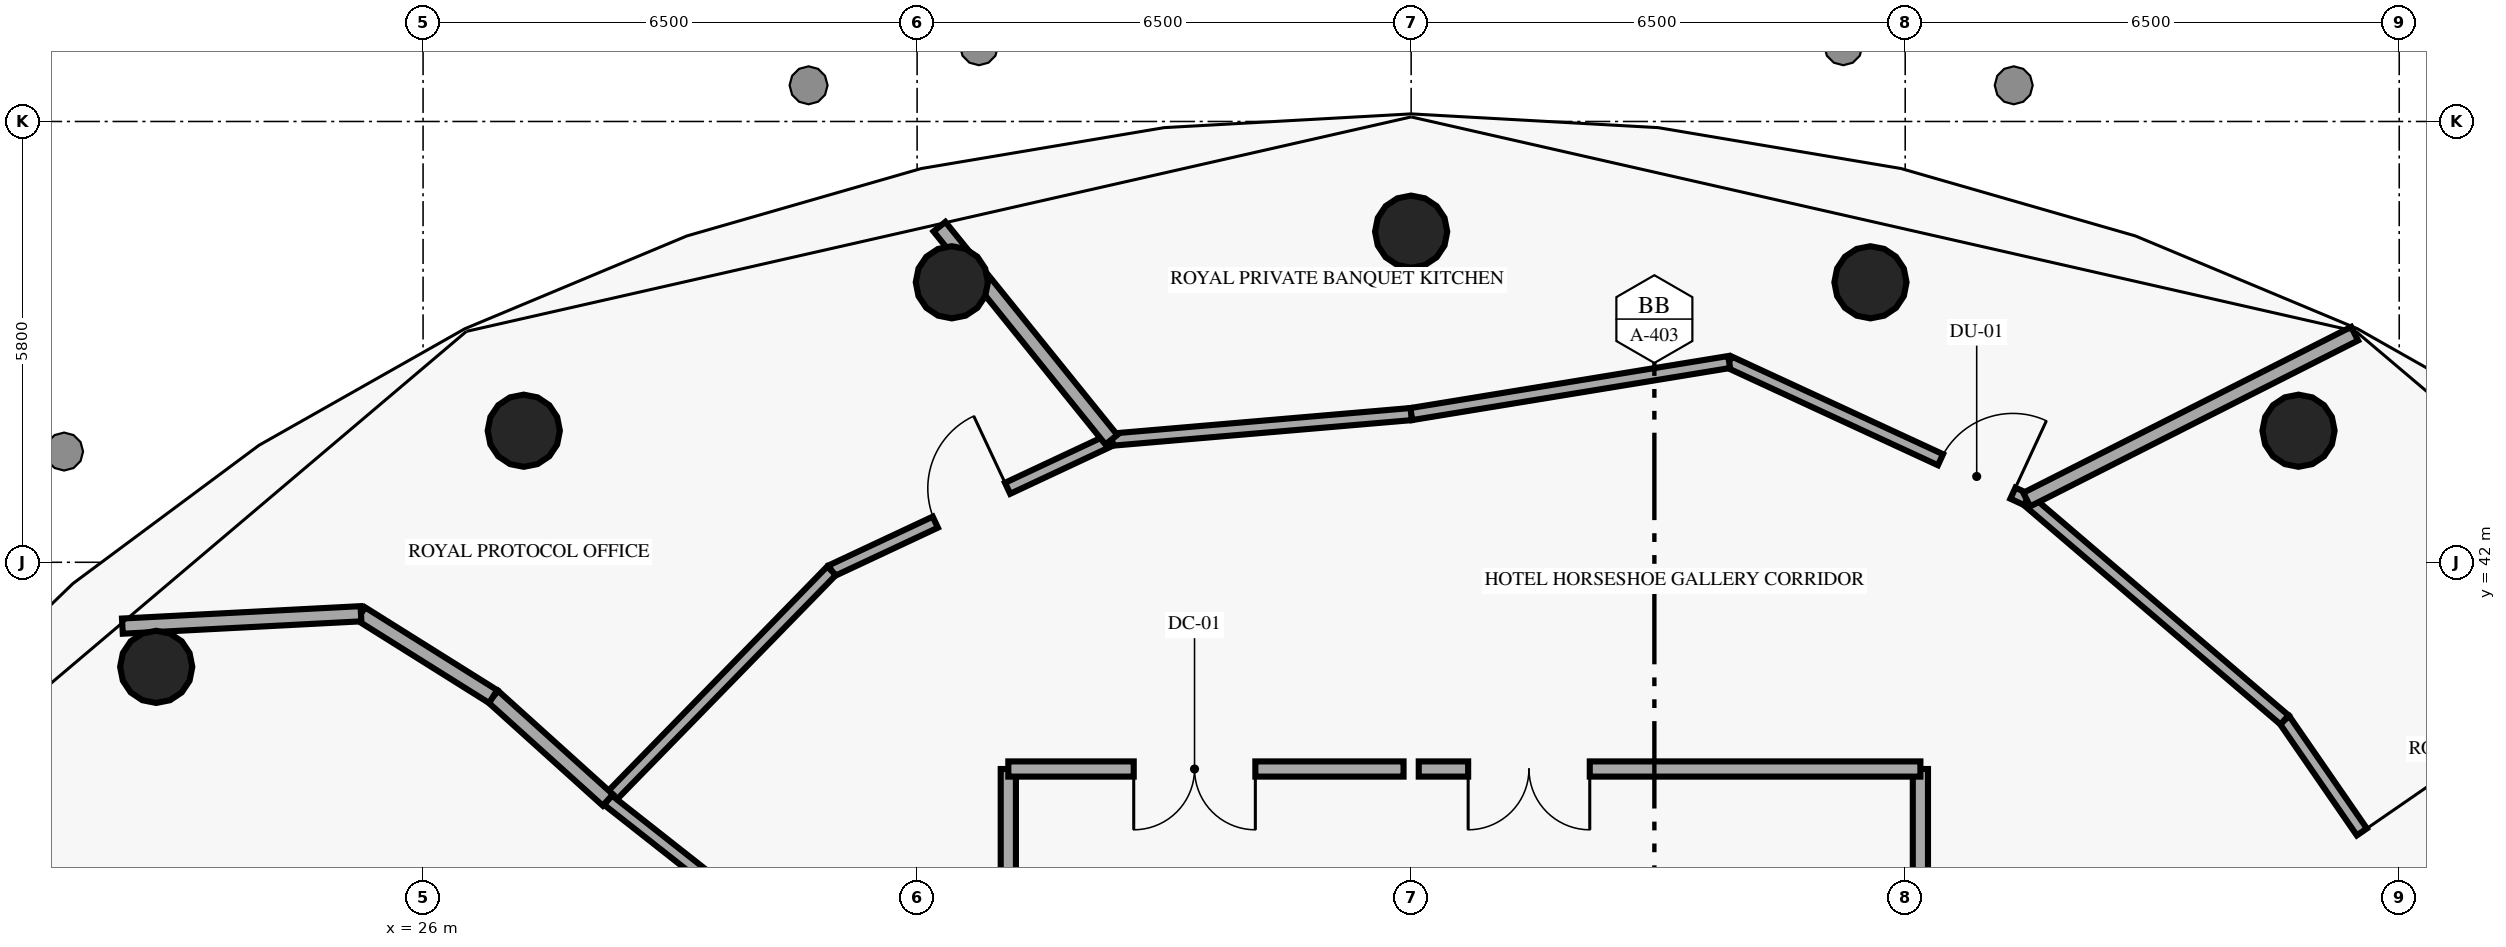
"""IFC4 building model, lengths in metres.
Left out: names, types, materials, properties, quantities, classifications, styles, units other than length and angle.
Written with IfcOpenShell. Run it as: python <this file> out.ifc"""

import sys

from ifc_helpers import new_model, si_unit, direction, frame, frame_2d, origin, origin_2d, place, context, subcontext, project, spatial, rectangle, circle, extrude, element, fill, save


model = new_model("IFC4")
c1 = context("Model", 3, precision=1e-05, world=origin(), true_north=direction((0.0, 1.0)))
c2 = subcontext(c1, "Body", "Model", "MODEL_VIEW")
j1 = project(units=[si_unit("LENGTHUNIT", "METRE"), si_unit("PLANEANGLEUNIT", "RADIAN")], contexts=[c1])
p1 = place(None, origin())
s1 = spatial("IfcSite", under=j1, at=p1, CompositionType="ELEMENT")
p2 = place(p1, origin())
s2 = spatial("IfcBuilding", under=s1, at=p2, CompositionType="ELEMENT")
p3 = place(p2, frame((0.0, 0.0, 192.25)))
s3 = spatial("IfcBuildingStorey", under=s2, at=p3, CompositionType="ELEMENT", Elevation=192.25)
for number, where, z_axis, x_axis in (
    (1, (50.675, 43.731, 0.0), (0.0, 0.0, 1.0), (1.0, 0.0, 0.0)),
    (2, (45.043, 45.684, 0.0), (0.0, 0.0, 1.0), (1.0, 0.0, 0.0)),
    (3, (39.0, 46.35, 0.0), (0.0, 0.0, 1.0), (1.0, 0.0, 0.0)),
    (4, (32.957, 45.684, 0.0), (0.0, 0.0, 1.0), (1.0, 0.0, 0.0)),
    (5, (27.325, 43.731, 0.0), (0.0, 0.0, 1.0), (1.0, 0.0, 0.0)),
    (6, (22.489, 40.624, 0.0), (0.0, 0.0, 1.0), (1.0, 0.0, 0.0)),
):
    element("IfcColumn", number, at=place(p3, frame(where, z_axis=z_axis, x_axis=x_axis)), inside=s3, PredefinedType="COLUMN", context=c2, shape_type="SweptSolid", body=[
        extrude(circle(Radius=0.475, at=origin_2d()), origin(), (0.0, 0.0, 1.0), 3.35),
    ])
for number, where, z_axis, x_axis in (
    (7, (33.7, 37.4, 0.0), (0.0, 0.0, 1.0), (0.0, 1.0, 0.0)),
    (8, (45.7, 37.4, 0.0), (0.0, 0.0, 1.0), (0.0, 1.0, 0.0)),
):
    element("IfcWall", number, at=place(p3, frame(where, z_axis=z_axis, x_axis=x_axis)), inside=s3, PredefinedType="SOLIDWALL", context=c2, shape_type="SweptSolid", body=[
        extrude(rectangle(XDim=1.88, YDim=0.2, at=frame_2d((0.94, 0.0))), origin(), (0.0, 0.0, 1.0), 3.35),
    ])
p4 = place(p3, frame((38.9, 39.28, 0.0), z_axis=(0.0, 0.0, 1.0), x_axis=(-1.0, 0.0, 0.0)))
e9 = element("IfcWall", 9, at=p4, inside=s3, PredefinedType="SOLIDWALL", context=c2, shape_type="SweptSolid", body=[
    extrude(rectangle(XDim=5.2, YDim=0.2, at=frame_2d((2.6, 0.0))), origin(), (0.0, 0.0, 1.0), 3.35),
])
p5 = place(p4, frame((1.95, 0.0, 0.0)))
e10 = element("IfcOpeningElement", 10, at=p5, cuts=e9, PredefinedType="OPENING", context=c2, shape_type="SweptSolid", body=[
    extrude(rectangle(XDim=1.6, YDim=2.2, at=frame_2d((0.8, 1.1))), frame((0.0, 0.11, 0.0), z_axis=(0.0, -1.0, 0.0), x_axis=(1.0, 0.0, 0.0)), (0.0, 0.0, 1.0), 0.22),
])
p6 = place(p3, frame((45.7, 39.28, 0.0), z_axis=(0.0, 0.0, 1.0), x_axis=(-1.0, 0.0, 0.0)))
e11 = element("IfcWall", 11, at=p6, inside=s3, PredefinedType="SOLIDWALL", context=c2, shape_type="SweptSolid", body=[
    extrude(rectangle(XDim=6.6, YDim=0.2, at=frame_2d((3.3, 0.0))), origin(), (0.0, 0.0, 1.0), 3.35),
])
p7 = place(p6, frame((4.35, 0.0, 0.0)))
e12 = element("IfcOpeningElement", 12, at=p7, cuts=e11, PredefinedType="OPENING", context=c2, shape_type="SweptSolid", body=[
    extrude(rectangle(XDim=1.6, YDim=2.2, at=frame_2d((0.8, 1.1))), frame((0.0, 0.11, 0.0), z_axis=(0.0, -1.0, 0.0), x_axis=(1.0, 0.0, 0.0)), (0.0, 0.0, 1.0), 0.22),
])
p8 = place(p3, frame((50.491, 39.926, 0.0), z_axis=(0.0, 0.0, 1.0), x_axis=(0.567945986758, -0.823065827334, 0.0)))
e13 = element("IfcWall", 13, at=p8, inside=s3, PredefinedType="PARTITIONING", context=c2, shape_type="SweptSolid", body=[
    extrude(rectangle(XDim=4.633, YDim=0.16, at=frame_2d((2.316, 0.0))), origin(), (0.0, 0.0, 1.0), 3.35),
])
p9 = place(p8, frame((1.791, 0.0, 0.0)))
e14 = element("IfcOpeningElement", 14, at=p9, cuts=e13, PredefinedType="OPENING", context=c2, shape_type="SweptSolid", body=[
    extrude(rectangle(XDim=1.05, YDim=2.15, at=frame_2d((0.525, 1.075))), frame((0.0, 0.09, 0.0), z_axis=(0.0, -1.0, 0.0), x_axis=(1.0, 0.0, 0.0)), (0.0, 0.0, 1.0), 0.18),
])
p10 = place(p3, frame((50.491, 39.926, 0.0), z_axis=(0.0, 0.0, 1.0), x_axis=(-0.760182801929, 0.64970924855, 0.0)))
e15 = element("IfcWall", 15, at=p10, inside=s3, PredefinedType="PARTITIONING", context=c2, shape_type="SweptSolid", body=[
    extrude(rectangle(XDim=4.462, YDim=0.16, at=frame_2d((2.231, 0.0))), origin(), (0.0, 0.0, 1.0), 3.35),
])
p11 = place(p3, frame((43.184, 44.635, 0.0), z_axis=(0.0, 0.0, 1.0), x_axis=(0.907684181703, -0.41965393634, 0.0)))
e16 = element("IfcWall", 16, at=p11, inside=s3, PredefinedType="PARTITIONING", context=c2, shape_type="SweptSolid", body=[
    extrude(rectangle(XDim=4.313, YDim=0.16, at=frame_2d((2.157, 0.0))), origin(), (0.0, 0.0, 1.0), 3.35),
])
p12 = place(p11, frame((3.063, 0.0, 0.0)))
e17 = element("IfcOpeningElement", 17, at=p12, cuts=e16, PredefinedType="OPENING", context=c2, shape_type="SweptSolid", body=[
    extrude(rectangle(XDim=1.05, YDim=2.15, at=frame_2d((0.525, 1.075))), frame((0.0, 0.09, 0.0), z_axis=(0.0, -1.0, 0.0), x_axis=(1.0, 0.0, 0.0)), (0.0, 0.0, 1.0), 0.18),
])
p13 = place(p3, frame((43.184, 44.635, 0.0), z_axis=(0.0, 0.0, 1.0), x_axis=(-0.986859895673, -0.161578297774, 0.0)))
e18 = element("IfcWall", 18, at=p13, inside=s3, PredefinedType="PARTITIONING", context=c2, shape_type="SweptSolid", body=[
    extrude(rectangle(XDim=4.24, YDim=0.16, at=frame_2d((2.12, 0.0))), origin(), (0.0, 0.0, 1.0), 3.35),
])
p14 = place(p3, frame((39.0, 43.95, 0.0), z_axis=(0.0, 0.0, 1.0), x_axis=(-0.996371347496, -0.085112501365, 0.0)))
e19 = element("IfcWall", 19, at=p14, inside=s3, PredefinedType="PARTITIONING", context=c2, shape_type="SweptSolid", body=[
    extrude(rectangle(XDim=3.958, YDim=0.16, at=frame_2d((1.979, 0.0))), origin(), (0.0, 0.0, 1.0), 3.35),
])
p15 = place(p3, frame((31.374, 41.888, 0.0), z_axis=(0.0, 0.0, 1.0), x_axis=(0.905533196688, 0.424275417266, 0.0)))
e20 = element("IfcWall", 20, at=p15, inside=s3, PredefinedType="PARTITIONING", context=c2, shape_type="SweptSolid", body=[
    extrude(rectangle(XDim=4.066, YDim=0.16, at=frame_2d((2.033, 0.0))), origin(), (0.0, 0.0, 1.0), 3.35),
])
p16 = place(p15, frame((1.508, 0.0, 0.0)))
e21 = element("IfcOpeningElement", 21, at=p16, cuts=e20, PredefinedType="OPENING", context=c2, shape_type="SweptSolid", body=[
    extrude(rectangle(XDim=1.05, YDim=2.15, at=frame_2d((0.525, 1.075))), frame((0.0, 0.09, 0.0), z_axis=(0.0, -1.0, 0.0), x_axis=(1.0, 0.0, 0.0)), (0.0, 0.0, 1.0), 0.18),
])
p17 = place(p3, frame((31.374, 41.888, 0.0), z_axis=(0.0, 0.0, 1.0), x_axis=(-0.698421583202, -0.715686587913, 0.0)))
e22 = element("IfcWall", 22, at=p17, inside=s3, PredefinedType="PARTITIONING", context=c2, shape_type="SweptSolid", body=[
    extrude(rectangle(XDim=4.214, YDim=0.16, at=frame_2d((2.107, 0.0))), origin(), (0.0, 0.0, 1.0), 3.35),
])
p18 = place(p3, frame((30.939, 36.897, 0.0), z_axis=(0.0, 0.0, 1.0), x_axis=(-0.785635850026, 0.618689187843, 0.0)))
e23 = element("IfcWall", 23, at=p18, inside=s3, PredefinedType="PARTITIONING", context=c2, shape_type="SweptSolid", body=[
    extrude(rectangle(XDim=3.192, YDim=0.16, at=frame_2d((1.596, 0.0))), origin(), (0.0, 0.0, 1.0), 3.35),
])
p19 = place(p3, frame((28.431, 38.872, 0.0), z_axis=(0.0, 0.0, 1.0), x_axis=(-0.742576754187, 0.669760975379, 0.0)))
e24 = element("IfcWall", 24, at=p19, inside=s3, PredefinedType="PARTITIONING", context=c2, shape_type="SweptSolid", body=[
    extrude(rectangle(XDim=2.032, YDim=0.2, at=frame_2d((1.016, 0.0))), origin(), (0.0, 0.0, 1.0), 3.35),
])
p20 = place(p3, frame((26.922, 40.233, 0.0), z_axis=(0.0, 0.0, 1.0), x_axis=(-0.847295877025, 0.53112116958, 0.0)))
e25 = element("IfcWall", 25, at=p20, inside=s3, PredefinedType="PARTITIONING", context=c2, shape_type="SweptSolid", body=[
    extrude(rectangle(XDim=2.052, YDim=0.2, at=frame_2d((1.026, 0.0))), origin(), (0.0, 0.0, 1.0), 3.35),
])
p21 = place(p3, frame((25.183, 41.323, 0.0), z_axis=(0.0, 0.0, 1.0), x_axis=(-0.9986532157, -0.051882123821, 0.0)))
e26 = element("IfcWall", 26, at=p21, inside=s3, PredefinedType="PARTITIONING", context=c2, shape_type="SweptSolid", body=[
    extrude(rectangle(XDim=3.143, YDim=0.2, at=frame_2d((1.572, 0.0))), origin(), (0.0, 0.0, 1.0), 3.35),
])
p22 = place(p3, frame((47.099, 42.825, 0.0), z_axis=(0.0, 0.0, 1.0), x_axis=(0.892255539141, 0.451530788398, 0.0)))
e27 = element("IfcWall", 27, at=p22, inside=s3, PredefinedType="PARTITIONING", context=c2, shape_type="SweptSolid", body=[
    extrude(rectangle(XDim=4.835, YDim=0.2, at=frame_2d((2.417, 0.0))), origin(), (0.0, 0.0, 1.0), 3.35),
])
p23 = place(p3, frame((35.056, 43.613, 0.0), z_axis=(0.0, 0.0, 1.0), x_axis=(-0.628004145017, 0.778209993409, 0.0)))
e28 = element("IfcWall", 28, at=p23, inside=s3, PredefinedType="PARTITIONING", context=c2, shape_type="SweptSolid", body=[
    extrude(rectangle(XDim=3.602, YDim=0.2, at=frame_2d((1.801, 0.0))), origin(), (0.0, 0.0, 1.0), 3.35),
])
p24 = place(p5, origin())
e29 = element("IfcDoor", 29, at=p24, inside=s3, OperationType="DOUBLE_DOOR_SINGLE_SWING", PredefinedType="DOOR", context=c2, shape_type="SweptSolid", body=[
    extrude(rectangle(XDim=1.6, YDim=2.2, at=frame_2d((0.8, 1.1))), frame((0.0, 0.025, 0.0), z_axis=(0.0, -1.0, 0.0), x_axis=(1.0, 0.0, 0.0)), (0.0, 0.0, 1.0), 0.05),
])
fill(e10, e29)
p25 = place(p7, origin())
e30 = element("IfcDoor", 30, at=p25, inside=s3, OperationType="DOUBLE_DOOR_SINGLE_SWING", PredefinedType="DOOR", context=c2, shape_type="SweptSolid", body=[
    extrude(rectangle(XDim=1.6, YDim=2.2, at=frame_2d((0.8, 1.1))), frame((0.0, 0.025, 0.0), z_axis=(0.0, -1.0, 0.0), x_axis=(1.0, 0.0, 0.0)), (0.0, 0.0, 1.0), 0.05),
])
fill(e12, e30)
p26 = place(p9, origin())
e31 = element("IfcDoor", 31, at=p26, inside=s3, OperationType="SINGLE_SWING_LEFT", PredefinedType="DOOR", context=c2, shape_type="SweptSolid", body=[
    extrude(rectangle(XDim=1.05, YDim=2.15, at=frame_2d((0.525, 1.075))), frame((0.0, 0.025, 0.0), z_axis=(0.0, -1.0, 0.0), x_axis=(1.0, 0.0, 0.0)), (0.0, 0.0, 1.0), 0.05),
])
fill(e14, e31)
p27 = place(p12, origin())
e32 = element("IfcDoor", 32, at=p27, inside=s3, OperationType="SINGLE_SWING_RIGHT", PredefinedType="DOOR", context=c2, shape_type="SweptSolid", body=[
    extrude(rectangle(XDim=1.05, YDim=2.15, at=frame_2d((0.525, 1.075))), frame((0.0, 0.025, 0.0), z_axis=(0.0, -1.0, 0.0), x_axis=(1.0, 0.0, 0.0)), (0.0, 0.0, 1.0), 0.05),
])
fill(e17, e32)
p28 = place(p16, origin())
e33 = element("IfcDoor", 33, at=p28, inside=s3, OperationType="SINGLE_SWING_RIGHT", PredefinedType="DOOR", context=c2, shape_type="SweptSolid", body=[
    extrude(rectangle(XDim=1.05, YDim=2.15, at=frame_2d((0.525, 1.075))), frame((0.0, 0.025, 0.0), z_axis=(0.0, -1.0, 0.0), x_axis=(1.0, 0.0, 0.0)), (0.0, 0.0, 1.0), 0.05),
])
fill(e21, e33)
save(model, sys.argv[1])
